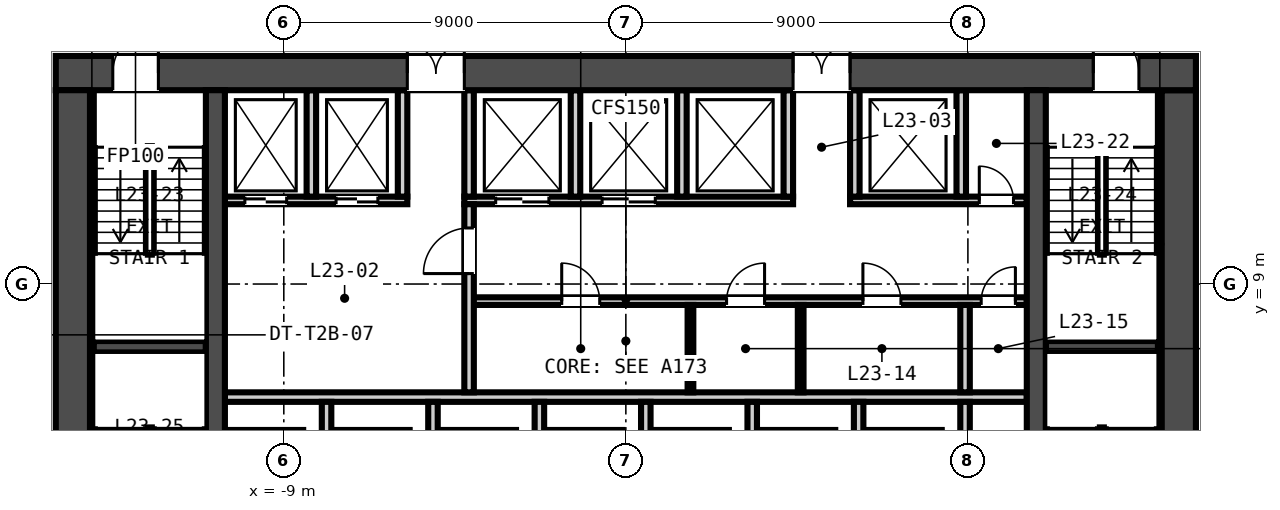
"""IFC4 building model, lengths in metres.
Left out: names, types, materials, properties, quantities, classifications, styles, units other than length and angle.
Written with IfcOpenShell. Run it as: python <this file> out.ifc"""

import sys

from ifc_helpers import new_model, si_unit, direction, frame, frame_2d, origin, place, context, subcontext, project, spatial, rectangle, extrude, element, fill, save


model = new_model("IFC4")
c1 = context("Model", 3, precision=1e-05, world=origin(), true_north=direction((0.0, 1.0)))
c2 = subcontext(c1, "Body", "Model", "MODEL_VIEW")
j1 = project(units=[si_unit("LENGTHUNIT", "METRE"), si_unit("PLANEANGLEUNIT", "RADIAN")], contexts=[c1])
p1 = place(None, origin())
s1 = spatial("IfcSite", under=j1, at=p1, CompositionType="ELEMENT")
p2 = place(p1, origin())
s2 = spatial("IfcBuilding", under=s1, at=p2, CompositionType="ELEMENT")
p3 = place(p2, frame((0.0, 0.0, 98.9)))
s3 = spatial("IfcBuildingStorey", under=s2, at=p3, CompositionType="ELEMENT", Elevation=98.9)
p4 = place(p3, frame((-15.0, 14.55, -0.15), z_axis=(0.0, 0.0, 1.0), x_axis=(1.0, 0.0, 0.0)))
e1 = element("IfcWall", 1, at=p4, inside=s3, PredefinedType="SOLIDWALL", context=c2, shape_type="SweptSolid", body=[
    extrude(rectangle(XDim=30.0, YDim=0.9, at=frame_2d((15.0, 0.0))), origin(), (0.0, 0.0, 1.0), 3.65),
])
p5 = place(p4, frame((9.25, 0.0, 0.15)))
e2 = element("IfcOpeningElement", 2, at=p5, cuts=e1, PredefinedType="OPENING", context=c2, shape_type="SweptSolid", body=[
    extrude(rectangle(XDim=1.5, YDim=2.1, at=frame_2d((0.75, 1.05))), frame((0.0, 0.46, 0.0), z_axis=(0.0, -1.0, 0.0), x_axis=(1.0, 0.0, 0.0)), (0.0, 0.0, 1.0), 0.92),
])
p6 = place(p4, frame((19.4, 0.0, 0.15)))
e3 = element("IfcOpeningElement", 3, at=p6, cuts=e1, PredefinedType="OPENING", context=c2, shape_type="SweptSolid", body=[
    extrude(rectangle(XDim=1.5, YDim=2.1, at=frame_2d((0.75, 1.05))), frame((0.0, 0.46, 0.0), z_axis=(0.0, -1.0, 0.0), x_axis=(1.0, 0.0, 0.0)), (0.0, 0.0, 1.0), 0.92),
])
p7 = place(p4, frame((1.5, 0.0, 0.15)))
e4 = element("IfcOpeningElement", 4, at=p7, cuts=e1, PredefinedType="OPENING", context=c2, shape_type="SweptSolid", body=[
    extrude(rectangle(XDim=1.2, YDim=2.1, at=frame_2d((0.6, 1.05))), frame((0.0, 0.46, 0.0), z_axis=(0.0, -1.0, 0.0), x_axis=(1.0, 0.0, 0.0)), (0.0, 0.0, 1.0), 0.92),
])
p8 = place(p4, frame((27.3, 0.0, 0.15)))
e5 = element("IfcOpeningElement", 5, at=p8, cuts=e1, PredefinedType="OPENING", context=c2, shape_type="SweptSolid", body=[
    extrude(rectangle(XDim=1.2, YDim=2.1, at=frame_2d((0.6, 1.05))), frame((0.0, 0.46, 0.0), z_axis=(0.0, -1.0, 0.0), x_axis=(1.0, 0.0, 0.0)), (0.0, 0.0, 1.0), 0.92),
])
for number, where, z_axis, x_axis in (
    (6, (-14.55, 0.9, -0.15), (0.0, 0.0, 1.0), (0.0, 1.0, 0.0)),
    (7, (14.55, 0.9, -0.15), (0.0, 0.0, 1.0), (0.0, 1.0, 0.0)),
):
    element("IfcWall", number, at=place(p3, frame(where, z_axis=z_axis, x_axis=x_axis)), inside=s3, PredefinedType="SOLIDWALL", context=c2, shape_type="SweptSolid", body=[
        extrude(rectangle(XDim=13.2, YDim=0.9, at=frame_2d((6.6, 0.0))), origin(), (0.0, 0.0, 1.0), 3.65),
    ])
for number, where, z_axis, x_axis in (
    (8, (-10.8, 0.9, -0.15), (0.0, 0.0, 1.0), (0.0, 1.0, 0.0)),
    (9, (10.8, 0.9, -0.15), (0.0, 0.0, 1.0), (0.0, 1.0, 0.0)),
):
    element("IfcWall", number, at=place(p3, frame(where, z_axis=z_axis, x_axis=x_axis)), inside=s3, PredefinedType="SOLIDWALL", context=c2, shape_type="SweptSolid", body=[
        extrude(rectangle(XDim=13.2, YDim=0.5, at=frame_2d((6.6, 0.0))), origin(), (0.0, 0.0, 1.0), 3.65),
    ])
p9 = place(p3, frame((-10.55, 6.025, 0.0), z_axis=(0.0, 0.0, 1.0), x_axis=(1.0, 0.0, 0.0)))
e10 = element("IfcWall", 10, at=p9, inside=s3, PredefinedType="PARTITIONING", context=c2, shape_type="SweptSolid", body=[
    extrude(rectangle(XDim=21.1, YDim=0.25, at=frame_2d((10.55, 0.0))), origin(), (0.0, 0.0, 1.0), 3.5),
])
p10 = place(p3, frame((-4.125, 8.55, 0.0), z_axis=(0.0, 0.0, 1.0), x_axis=(1.0, 0.0, 0.0)))
e11 = element("IfcWall", 11, at=p10, inside=s3, PredefinedType="PARTITIONING", context=c2, shape_type="SweptSolid", body=[
    extrude(rectangle(XDim=14.675, YDim=0.2, at=frame_2d((7.337, 0.0))), origin(), (0.0, 0.0, 1.0), 3.5),
])
p11 = place(p10, frame((2.438, 0.0, 0.0)))
e12 = element("IfcOpeningElement", 12, at=p11, cuts=e11, PredefinedType="OPENING", context=c2, shape_type="SweptSolid", body=[
    extrude(rectangle(XDim=1.0, YDim=2.1, at=frame_2d((0.5, 1.05))), frame((0.0, 0.11, 0.0), z_axis=(0.0, -1.0, 0.0), x_axis=(1.0, 0.0, 0.0)), (0.0, 0.0, 1.0), 0.22),
])
p12 = place(p10, frame((6.775, 0.0, 0.0)))
e13 = element("IfcOpeningElement", 13, at=p12, cuts=e11, PredefinedType="OPENING", context=c2, shape_type="SweptSolid", body=[
    extrude(rectangle(XDim=1.0, YDim=2.1, at=frame_2d((0.5, 1.05))), frame((0.0, 0.11, 0.0), z_axis=(0.0, -1.0, 0.0), x_axis=(1.0, 0.0, 0.0)), (0.0, 0.0, 1.0), 0.22),
])
p13 = place(p10, frame((10.363, 0.0, 0.0)))
e14 = element("IfcOpeningElement", 14, at=p13, cuts=e11, PredefinedType="OPENING", context=c2, shape_type="SweptSolid", body=[
    extrude(rectangle(XDim=1.0, YDim=2.1, at=frame_2d((0.5, 1.05))), frame((0.0, 0.11, 0.0), z_axis=(0.0, -1.0, 0.0), x_axis=(1.0, 0.0, 0.0)), (0.0, 0.0, 1.0), 0.22),
])
p14 = place(p10, frame((13.475, 0.0, 0.0)))
e15 = element("IfcOpeningElement", 15, at=p14, cuts=e11, PredefinedType="OPENING", context=c2, shape_type="SweptSolid", body=[
    extrude(rectangle(XDim=0.9, YDim=2.1, at=frame_2d((0.45, 1.05))), frame((0.0, 0.11, 0.0), z_axis=(0.0, -1.0, 0.0), x_axis=(1.0, 0.0, 0.0)), (0.0, 0.0, 1.0), 0.22),
])
p15 = place(p3, frame((-10.55, 11.2, 0.0), z_axis=(0.0, 0.0, 1.0), x_axis=(1.0, 0.0, 0.0)))
e16 = element("IfcWall", 16, at=p15, inside=s3, PredefinedType="PARTITIONING", context=c2, shape_type="SweptSolid", body=[
    extrude(rectangle(XDim=4.8, YDim=0.2, at=frame_2d((2.4, 0.0))), origin(), (0.0, 0.0, 1.0), 3.5),
])
p16 = place(p15, frame((0.525, 0.0, 0.0)))
e17 = element("IfcOpeningElement", 17, at=p16, cuts=e16, PredefinedType="OPENING", context=c2, shape_type="SweptSolid", body=[
    extrude(rectangle(XDim=1.1, YDim=2.1, at=frame_2d((0.55, 1.05))), frame((0.0, 0.11, 0.0), z_axis=(0.0, -1.0, 0.0), x_axis=(1.0, 0.0, 0.0)), (0.0, 0.0, 1.0), 0.22),
])
p17 = place(p15, frame((2.925, 0.0, 0.0)))
e18 = element("IfcOpeningElement", 18, at=p17, cuts=e16, PredefinedType="OPENING", context=c2, shape_type="SweptSolid", body=[
    extrude(rectangle(XDim=1.1, YDim=2.1, at=frame_2d((0.55, 1.05))), frame((0.0, 0.11, 0.0), z_axis=(0.0, -1.0, 0.0), x_axis=(1.0, 0.0, 0.0)), (0.0, 0.0, 1.0), 0.22),
])
p18 = place(p3, frame((-4.25, 11.2, 0.0), z_axis=(0.0, 0.0, 1.0), x_axis=(1.0, 0.0, 0.0)))
e19 = element("IfcWall", 19, at=p18, inside=s3, PredefinedType="PARTITIONING", context=c2, shape_type="SweptSolid", body=[
    extrude(rectangle(XDim=8.65, YDim=0.2, at=frame_2d((4.325, 0.0))), origin(), (0.0, 0.0, 1.0), 3.5),
])
p19 = place(p18, frame((0.825, 0.0, 0.0)))
e20 = element("IfcOpeningElement", 20, at=p19, cuts=e19, PredefinedType="OPENING", context=c2, shape_type="SweptSolid", body=[
    extrude(rectangle(XDim=1.4, YDim=2.1, at=frame_2d((0.7, 1.05))), frame((0.0, 0.11, 0.0), z_axis=(0.0, -1.0, 0.0), x_axis=(1.0, 0.0, 0.0)), (0.0, 0.0, 1.0), 0.22),
])
p20 = place(p18, frame((3.625, 0.0, 0.0)))
e21 = element("IfcOpeningElement", 21, at=p20, cuts=e19, PredefinedType="OPENING", context=c2, shape_type="SweptSolid", body=[
    extrude(rectangle(XDim=1.4, YDim=2.1, at=frame_2d((0.7, 1.05))), frame((0.0, 0.11, 0.0), z_axis=(0.0, -1.0, 0.0), x_axis=(1.0, 0.0, 0.0)), (0.0, 0.0, 1.0), 0.22),
])
p21 = place(p3, frame((5.9, 11.2, 0.0), z_axis=(0.0, 0.0, 1.0), x_axis=(1.0, 0.0, 0.0)))
e22 = element("IfcWall", 22, at=p21, inside=s3, PredefinedType="PARTITIONING", context=c2, shape_type="SweptSolid", body=[
    extrude(rectangle(XDim=4.65, YDim=0.2, at=frame_2d((2.325, 0.0))), origin(), (0.0, 0.0, 1.0), 3.5),
])
p22 = place(p21, frame((3.4, 0.0, 0.0)))
e23 = element("IfcOpeningElement", 23, at=p22, cuts=e22, PredefinedType="OPENING", context=c2, shape_type="SweptSolid", body=[
    extrude(rectangle(XDim=0.9, YDim=2.1, at=frame_2d((0.45, 1.05))), frame((0.0, 0.11, 0.0), z_axis=(0.0, -1.0, 0.0), x_axis=(1.0, 0.0, 0.0)), (0.0, 0.0, 1.0), 0.22),
])
p23 = place(p3, frame((-4.125, 6.15, 0.0), z_axis=(0.0, 0.0, 1.0), x_axis=(0.0, 1.0, 0.0)))
e24 = element("IfcWall", 24, at=p23, inside=s3, PredefinedType="PARTITIONING", context=c2, shape_type="SweptSolid", body=[
    extrude(rectangle(XDim=4.95, YDim=0.25, at=frame_2d((2.475, 0.0))), origin(), (0.0, 0.0, 1.0), 3.5),
])
p24 = place(p23, frame((3.125, 0.0, 0.0)))
e25 = element("IfcOpeningElement", 25, at=p24, cuts=e24, PredefinedType="OPENING", context=c2, shape_type="SweptSolid", body=[
    extrude(rectangle(XDim=1.2, YDim=2.1, at=frame_2d((0.6, 1.05))), frame((0.0, 0.135, 0.0), z_axis=(0.0, -1.0, 0.0), x_axis=(1.0, 0.0, 0.0)), (0.0, 0.0, 1.0), 0.27),
])
for number, where, z_axis, x_axis in (
    (26, (-7.875, 3.6, 0.0), (0.0, 0.0, 1.0), (0.0, 1.0, 0.0)),
    (27, (-5.075, 3.6, 0.0), (0.0, 0.0, 1.0), (0.0, 1.0, 0.0)),
    (28, (-2.275, 3.6, 0.0), (0.0, 0.0, 1.0), (0.0, 1.0, 0.0)),
    (29, (0.525, 3.6, 0.0), (0.0, 0.0, 1.0), (0.0, 1.0, 0.0)),
    (30, (3.325, 3.6, 0.0), (0.0, 0.0, 1.0), (0.0, 1.0, 0.0)),
    (31, (6.125, 3.6, 0.0), (0.0, 0.0, 1.0), (0.0, 1.0, 0.0)),
    (32, (8.925, 3.6, 0.0), (0.0, 0.0, 1.0), (0.0, 1.0, 0.0)),
):
    element("IfcWall", number, at=place(p3, frame(where, z_axis=z_axis, x_axis=x_axis)), inside=s3, PredefinedType="PARTITIONING", context=c2, shape_type="SweptSolid", body=[
        extrude(rectangle(XDim=2.3, YDim=0.25, at=frame_2d((1.15, 0.0))), origin(), (0.0, 0.0, 1.0), 3.5),
    ])
for number, where, z_axis, x_axis in (
    (33, (1.7, 6.15, 0.0), (0.0, 0.0, 1.0), (0.0, 1.0, 0.0)),
    (34, (4.6, 6.15, 0.0), (0.0, 0.0, 1.0), (0.0, 1.0, 0.0)),
):
    element("IfcWall", number, at=place(p3, frame(where, z_axis=z_axis, x_axis=x_axis)), inside=s3, PredefinedType="PARTITIONING", context=c2, shape_type="SweptSolid", body=[
        extrude(rectangle(XDim=2.3, YDim=0.15, at=frame_2d((1.15, 0.0))), origin(), (0.0, 0.0, 1.0), 3.5),
    ])
p25 = place(p3, frame((8.925, 6.15, 0.0), z_axis=(0.0, 0.0, 1.0), x_axis=(0.0, 1.0, 0.0)))
e35 = element("IfcWall", 35, at=p25, inside=s3, PredefinedType="PARTITIONING", context=c2, shape_type="SweptSolid", body=[
    extrude(rectangle(XDim=2.3, YDim=0.25, at=frame_2d((1.15, 0.0))), origin(), (0.0, 0.0, 1.0), 3.5),
])
for number, where, z_axis, x_axis in (
    (36, (-8.275, 11.3, 0.0), (0.0, 0.0, 1.0), (0.0, 1.0, 0.0)),
    (37, (-5.875, 11.3, 0.0), (0.0, 0.0, 1.0), (0.0, 1.0, 0.0)),
    (38, (-4.125, 11.3, 0.0), (0.0, 0.0, 1.0), (0.0, 1.0, 0.0)),
    (39, (-1.325, 11.3, 0.0), (0.0, 0.0, 1.0), (0.0, 1.0, 0.0)),
    (40, (1.475, 11.3, 0.0), (0.0, 0.0, 1.0), (0.0, 1.0, 0.0)),
    (41, (4.275, 11.3, 0.0), (0.0, 0.0, 1.0), (0.0, 1.0, 0.0)),
    (42, (6.025, 11.3, 0.0), (0.0, 0.0, 1.0), (0.0, 1.0, 0.0)),
    (43, (8.825, 11.3, 0.0), (0.0, 0.0, 1.0), (0.0, 1.0, 0.0)),
):
    element("IfcWall", number, at=place(p3, frame(where, z_axis=z_axis, x_axis=x_axis)), inside=s3, PredefinedType="PARTITIONING", context=c2, shape_type="SweptSolid", body=[
        extrude(rectangle(XDim=2.8, YDim=0.25, at=frame_2d((1.4, 0.0))), origin(), (0.0, 0.0, 1.0), 3.5),
    ])
p26 = place(p3, frame((-14.0, 7.35, 0.0), z_axis=(0.0, 0.0, 1.0), x_axis=(1.0, 0.0, 0.0)))
e44 = element("IfcWall", 44, at=p26, inside=s3, PredefinedType="SOLIDWALL", context=c2, shape_type="SweptSolid", body=[
    extrude(rectangle(XDim=2.95, YDim=0.3, at=frame_2d((1.475, 0.0))), origin(), (0.0, 0.0, 1.0), 3.5),
])
p27 = place(p3, frame((-14.05, 0.9, 0.0), z_axis=(0.0, 0.0, 1.0), x_axis=(0.0, 1.0, 0.0)))
e45 = element("IfcWall", 45, at=p27, inside=s3, PredefinedType="SOLIDWALL", context=c2, shape_type="SweptSolid", body=[
    extrude(rectangle(XDim=13.2, YDim=0.1, at=frame_2d((6.6, 0.0))), origin(), (0.0, 0.0, 1.0), 3.5),
])
p28 = place(p3, frame((11.05, 7.35, 0.0), z_axis=(0.0, 0.0, 1.0), x_axis=(1.0, 0.0, 0.0)))
e46 = element("IfcWall", 46, at=p28, inside=s3, PredefinedType="SOLIDWALL", context=c2, shape_type="SweptSolid", body=[
    extrude(rectangle(XDim=2.95, YDim=0.3, at=frame_2d((1.475, 0.0))), origin(), (0.0, 0.0, 1.0), 3.5),
])
p29 = place(p3, frame((14.05, 0.9, 0.0), z_axis=(0.0, 0.0, 1.0), x_axis=(0.0, 1.0, 0.0)))
e47 = element("IfcWall", 47, at=p29, inside=s3, PredefinedType="SOLIDWALL", context=c2, shape_type="SweptSolid", body=[
    extrude(rectangle(XDim=13.2, YDim=0.1, at=frame_2d((6.6, 0.0))), origin(), (0.0, 0.0, 1.0), 3.5),
])
p30 = place(p24, origin())
e48 = element("IfcDoor", 48, at=p30, inside=s3, OperationType="SINGLE_SWING_LEFT", PredefinedType="DOOR", context=c2, shape_type="SweptSolid", body=[
    extrude(rectangle(XDim=1.2, YDim=2.1, at=frame_2d((0.6, 1.05))), frame((0.0, 0.025, 0.0), z_axis=(0.0, -1.0, 0.0), x_axis=(1.0, 0.0, 0.0)), (0.0, 0.0, 1.0), 0.05),
])
fill(e25, e48)
p31 = place(p11, origin())
e49 = element("IfcDoor", 49, at=p31, inside=s3, OperationType="SINGLE_SWING_LEFT", PredefinedType="DOOR", context=c2, shape_type="SweptSolid", body=[
    extrude(rectangle(XDim=1.0, YDim=2.1, at=frame_2d((0.5, 1.05))), frame((0.0, 0.025, 0.0), z_axis=(0.0, -1.0, 0.0), x_axis=(1.0, 0.0, 0.0)), (0.0, 0.0, 1.0), 0.05),
])
fill(e12, e49)
p32 = place(p12, origin())
e50 = element("IfcDoor", 50, at=p32, inside=s3, OperationType="SINGLE_SWING_RIGHT", PredefinedType="DOOR", context=c2, shape_type="SweptSolid", body=[
    extrude(rectangle(XDim=1.0, YDim=2.1, at=frame_2d((0.5, 1.05))), frame((0.0, 0.025, 0.0), z_axis=(0.0, -1.0, 0.0), x_axis=(1.0, 0.0, 0.0)), (0.0, 0.0, 1.0), 0.05),
])
fill(e13, e50)
p33 = place(p13, origin())
e51 = element("IfcDoor", 51, at=p33, inside=s3, OperationType="SINGLE_SWING_LEFT", PredefinedType="DOOR", context=c2, shape_type="SweptSolid", body=[
    extrude(rectangle(XDim=1.0, YDim=2.1, at=frame_2d((0.5, 1.05))), frame((0.0, 0.025, 0.0), z_axis=(0.0, -1.0, 0.0), x_axis=(1.0, 0.0, 0.0)), (0.0, 0.0, 1.0), 0.05),
])
fill(e14, e51)
p34 = place(p14, origin())
e52 = element("IfcDoor", 52, at=p34, inside=s3, OperationType="SINGLE_SWING_RIGHT", PredefinedType="DOOR", context=c2, shape_type="SweptSolid", body=[
    extrude(rectangle(XDim=0.9, YDim=2.1, at=frame_2d((0.45, 1.05))), frame((0.0, 0.025, 0.0), z_axis=(0.0, -1.0, 0.0), x_axis=(1.0, 0.0, 0.0)), (0.0, 0.0, 1.0), 0.05),
])
fill(e15, e52)
p35 = place(p16, origin())
e53 = element("IfcDoor", 53, at=p35, inside=s3, OperationType="DOUBLE_DOOR_SLIDING", PredefinedType="DOOR", context=c2, shape_type="SweptSolid", body=[
    extrude(rectangle(XDim=1.1, YDim=2.1, at=frame_2d((0.55, 1.05))), frame((0.0, 0.025, 0.0), z_axis=(0.0, -1.0, 0.0), x_axis=(1.0, 0.0, 0.0)), (0.0, 0.0, 1.0), 0.05),
])
fill(e17, e53)
p36 = place(p17, origin())
e54 = element("IfcDoor", 54, at=p36, inside=s3, OperationType="DOUBLE_DOOR_SLIDING", PredefinedType="DOOR", context=c2, shape_type="SweptSolid", body=[
    extrude(rectangle(XDim=1.1, YDim=2.1, at=frame_2d((0.55, 1.05))), frame((0.0, 0.025, 0.0), z_axis=(0.0, -1.0, 0.0), x_axis=(1.0, 0.0, 0.0)), (0.0, 0.0, 1.0), 0.05),
])
fill(e18, e54)
p37 = place(p19, origin())
e55 = element("IfcDoor", 55, at=p37, inside=s3, OperationType="DOUBLE_DOOR_SLIDING", PredefinedType="DOOR", context=c2, shape_type="SweptSolid", body=[
    extrude(rectangle(XDim=1.4, YDim=2.1, at=frame_2d((0.7, 1.05))), frame((0.0, 0.025, 0.0), z_axis=(0.0, -1.0, 0.0), x_axis=(1.0, 0.0, 0.0)), (0.0, 0.0, 1.0), 0.05),
])
fill(e20, e55)
p38 = place(p20, origin())
e56 = element("IfcDoor", 56, at=p38, inside=s3, OperationType="DOUBLE_DOOR_SLIDING", PredefinedType="DOOR", context=c2, shape_type="SweptSolid", body=[
    extrude(rectangle(XDim=1.4, YDim=2.1, at=frame_2d((0.7, 1.05))), frame((0.0, 0.025, 0.0), z_axis=(0.0, -1.0, 0.0), x_axis=(1.0, 0.0, 0.0)), (0.0, 0.0, 1.0), 0.05),
])
fill(e21, e56)
p39 = place(p22, origin())
e57 = element("IfcDoor", 57, at=p39, inside=s3, OperationType="SINGLE_SWING_LEFT", PredefinedType="DOOR", context=c2, shape_type="SweptSolid", body=[
    extrude(rectangle(XDim=0.9, YDim=2.1, at=frame_2d((0.45, 1.05))), frame((0.0, 0.025, 0.0), z_axis=(0.0, -1.0, 0.0), x_axis=(1.0, 0.0, 0.0)), (0.0, 0.0, 1.0), 0.05),
])
fill(e23, e57)
p40 = place(p5, origin())
e58 = element("IfcDoor", 58, at=p40, inside=s3, OperationType="DOUBLE_DOOR_SINGLE_SWING", PredefinedType="DOOR", context=c2, shape_type="SweptSolid", body=[
    extrude(rectangle(XDim=1.5, YDim=2.1, at=frame_2d((0.75, 1.05))), frame((0.0, 0.025, 0.0), z_axis=(0.0, -1.0, 0.0), x_axis=(1.0, 0.0, 0.0)), (0.0, 0.0, 1.0), 0.05),
])
fill(e2, e58)
p41 = place(p6, origin())
e59 = element("IfcDoor", 59, at=p41, inside=s3, OperationType="DOUBLE_DOOR_SINGLE_SWING", PredefinedType="DOOR", context=c2, shape_type="SweptSolid", body=[
    extrude(rectangle(XDim=1.5, YDim=2.1, at=frame_2d((0.75, 1.05))), frame((0.0, 0.025, 0.0), z_axis=(0.0, -1.0, 0.0), x_axis=(1.0, 0.0, 0.0)), (0.0, 0.0, 1.0), 0.05),
])
fill(e3, e59)
p42 = place(p7, origin())
e60 = element("IfcDoor", 60, at=p42, inside=s3, OperationType="SINGLE_SWING_RIGHT", PredefinedType="DOOR", context=c2, shape_type="SweptSolid", body=[
    extrude(rectangle(XDim=1.2, YDim=2.1, at=frame_2d((0.6, 1.05))), frame((0.0, 0.025, 0.0), z_axis=(0.0, -1.0, 0.0), x_axis=(1.0, 0.0, 0.0)), (0.0, 0.0, 1.0), 0.05),
])
fill(e4, e60)
p43 = place(p8, origin())
e61 = element("IfcDoor", 61, at=p43, inside=s3, OperationType="SINGLE_SWING_LEFT", PredefinedType="DOOR", context=c2, shape_type="SweptSolid", body=[
    extrude(rectangle(XDim=1.2, YDim=2.1, at=frame_2d((0.6, 1.05))), frame((0.0, 0.025, 0.0), z_axis=(0.0, -1.0, 0.0), x_axis=(1.0, 0.0, 0.0)), (0.0, 0.0, 1.0), 0.05),
])
fill(e5, e61)
save(model, sys.argv[1])
